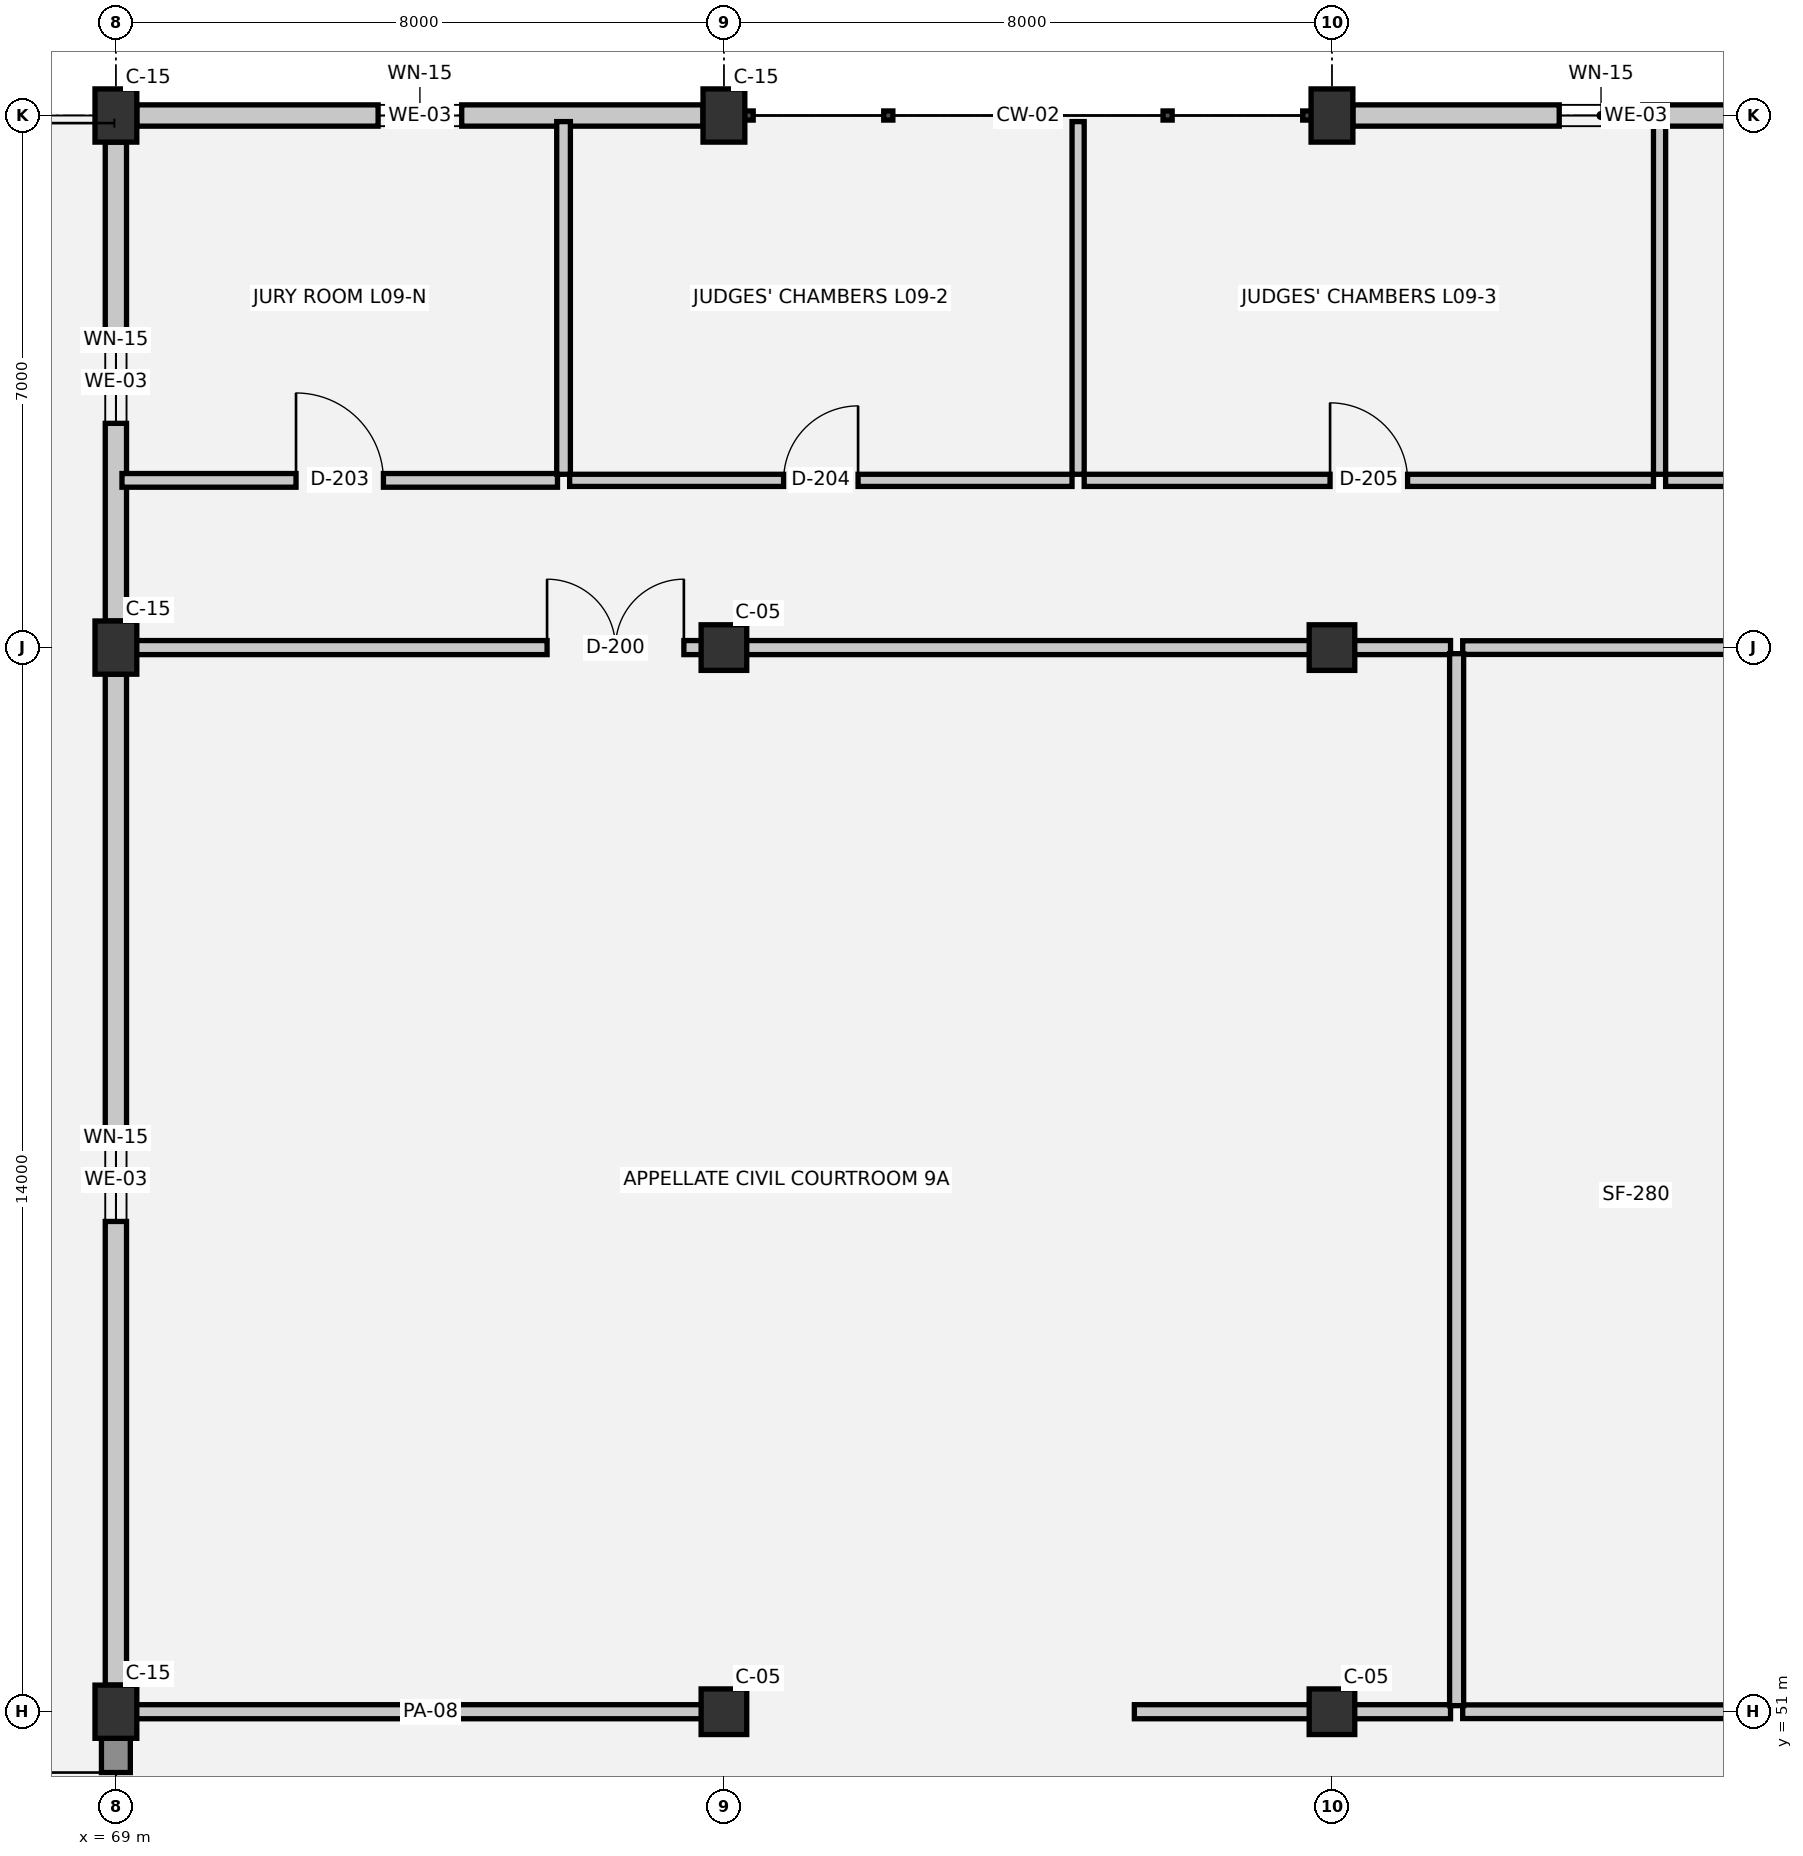
"""IFC4 building model, lengths in metres.
Left out: names, types, materials, properties, quantities, classifications, styles, units other than length and angle.
Written with IfcOpenShell. Run it as: python <this file> out.ifc"""

import sys

from ifc_helpers import new_model, si_unit, direction, frame, frame_2d, origin, origin_2d, place, context, subcontext, project, spatial, rectangle, extrude, element, fill, save


model = new_model("IFC4")
c1 = context("Model", 3, precision=1e-05, world=origin(), true_north=direction((0.0, 1.0)))
c2 = subcontext(c1, "Body", "Model", "MODEL_VIEW")
j1 = project(units=[si_unit("LENGTHUNIT", "METRE"), si_unit("PLANEANGLEUNIT", "RADIAN")], contexts=[c1])
p1 = place(None, origin())
s1 = spatial("IfcSite", under=j1, at=p1, CompositionType="ELEMENT")
p2 = place(p1, origin())
s2 = spatial("IfcBuilding", under=s1, at=p2, CompositionType="ELEMENT")
p3 = place(p2, frame((0.0, 0.0, 33.3)))
s3 = spatial("IfcBuildingStorey", under=s2, at=p3, CompositionType="ELEMENT", Elevation=33.3)
for number, where, z_axis, x_axis in (
    (1, (69.0, 51.0, 0.0), (0.0, 0.0, 1.0), (1.0, 0.0, 0.0)),
    (2, (69.0, 65.0, 0.0), (0.0, 0.0, 1.0), (1.0, 0.0, 0.0)),
    (3, (69.0, 72.0, 0.0), (0.0, 0.0, 1.0), (1.0, 0.0, 0.0)),
):
    element("IfcColumn", number, at=place(p3, frame(where, z_axis=z_axis, x_axis=x_axis)), inside=s3, PredefinedType="COLUMN", context=c2, shape_type="SweptSolid", body=[
        extrude(rectangle(XDim=0.55, YDim=0.7, at=origin_2d()), origin(), (0.0, 0.0, 1.0), 3.75),
    ])
for number, where, z_axis, x_axis in (
    (4, (77.0, 51.0, 0.0), (0.0, 0.0, 1.0), (1.0, 0.0, 0.0)),
    (5, (77.0, 65.0, 0.0), (0.0, 0.0, 1.0), (1.0, 0.0, 0.0)),
):
    element("IfcColumn", number, at=place(p3, frame(where, z_axis=z_axis, x_axis=x_axis)), inside=s3, PredefinedType="COLUMN", context=c2, shape_type="SweptSolid", body=[
        extrude(rectangle(XDim=0.6, YDim=0.6, at=origin_2d()), origin(), (0.0, 0.0, 1.0), 3.75),
    ])
p4 = place(p3, frame((77.0, 72.0, 0.0), z_axis=(0.0, 0.0, 1.0), x_axis=(1.0, 0.0, 0.0)))
e6 = element("IfcColumn", 6, at=p4, inside=s3, PredefinedType="COLUMN", context=c2, shape_type="SweptSolid", body=[
    extrude(rectangle(XDim=0.55, YDim=0.7, at=origin_2d()), origin(), (0.0, 0.0, 1.0), 3.75),
])
for number, where, z_axis, x_axis in (
    (7, (85.0, 51.0, 0.0), (0.0, 0.0, 1.0), (1.0, 0.0, 0.0)),
    (8, (85.0, 65.0, 0.0), (0.0, 0.0, 1.0), (1.0, 0.0, 0.0)),
):
    element("IfcColumn", number, at=place(p3, frame(where, z_axis=z_axis, x_axis=x_axis)), inside=s3, PredefinedType="COLUMN", context=c2, shape_type="SweptSolid", body=[
        extrude(rectangle(XDim=0.6, YDim=0.6, at=origin_2d()), origin(), (0.0, 0.0, 1.0), 3.75),
    ])
p5 = place(p3, frame((85.0, 72.0, 0.0), z_axis=(0.0, 0.0, 1.0), x_axis=(1.0, 0.0, 0.0)))
e9 = element("IfcColumn", 9, at=p5, inside=s3, PredefinedType="COLUMN", context=c2, shape_type="SweptSolid", body=[
    extrude(rectangle(XDim=0.55, YDim=0.7, at=origin_2d()), origin(), (0.0, 0.0, 1.0), 3.75),
])
p6 = place(p3, frame((69.0, 44.35, 0.0), z_axis=(0.0, 0.0, 1.0), x_axis=(0.0, 1.0, 0.0)))
e10 = element("IfcWall", 10, at=p6, inside=s3, PredefinedType="STANDARD", context=c2, shape_type="SweptSolid", body=[
    extrude(rectangle(XDim=6.3, YDim=0.38, at=frame_2d((3.15, 0.0))), origin(), (0.0, 0.0, 1.0), 2.6),
])
p7 = place(p6, frame((4.05, 0.0, 0.0)))
e11 = element("IfcOpeningElement", 11, at=p7, cuts=e10, PredefinedType="OPENING", context=c2, shape_type="SweptSolid", body=[
    extrude(rectangle(XDim=1.8, YDim=2.2, at=frame_2d((0.9, 1.1))), frame((0.0, 0.2, 0.0), z_axis=(0.0, -1.0, 0.0), x_axis=(1.0, 0.0, 0.0)), (0.0, 0.0, 1.0), 0.4),
])
p8 = place(p3, frame((69.0, 51.35, 0.0), z_axis=(0.0, 0.0, 1.0), x_axis=(0.0, 1.0, 0.0)))
e12 = element("IfcWall", 12, at=p8, inside=s3, PredefinedType="SOLIDWALL", context=c2, shape_type="SweptSolid", body=[
    extrude(rectangle(XDim=13.3, YDim=0.28, at=frame_2d((6.65, 0.0))), origin(), (0.0, 0.0, 1.0), 2.6),
])
p9 = place(p8, frame((6.1, 0.0, 0.9)))
e13 = element("IfcOpeningElement", 13, at=p9, cuts=e12, PredefinedType="OPENING", context=c2, shape_type="SweptSolid", body=[
    extrude(rectangle(XDim=1.1, YDim=1.2, at=frame_2d((0.55, 0.6))), frame((0.0, 0.15, 0.0), z_axis=(0.0, -1.0, 0.0), x_axis=(1.0, 0.0, 0.0)), (0.0, 0.0, 1.0), 0.3),
])
p10 = place(p3, frame((69.0, 65.35, 0.0), z_axis=(0.0, 0.0, 1.0), x_axis=(0.0, 1.0, 0.0)))
e14 = element("IfcWall", 14, at=p10, inside=s3, PredefinedType="SOLIDWALL", context=c2, shape_type="SweptSolid", body=[
    extrude(rectangle(XDim=6.3, YDim=0.28, at=frame_2d((3.15, 0.0))), origin(), (0.0, 0.0, 1.0), 2.6),
])
p11 = place(p10, frame((2.6, 0.0, 0.9)))
e15 = element("IfcOpeningElement", 15, at=p11, cuts=e14, PredefinedType="OPENING", context=c2, shape_type="SweptSolid", body=[
    extrude(rectangle(XDim=1.1, YDim=1.2, at=frame_2d((0.55, 0.6))), frame((0.0, 0.15, 0.0), z_axis=(0.0, -1.0, 0.0), x_axis=(1.0, 0.0, 0.0)), (0.0, 0.0, 1.0), 0.3),
])
p12 = place(p3, frame((69.275, 72.0, 0.0), z_axis=(0.0, 0.0, 1.0), x_axis=(1.0, 0.0, 0.0)))
e16 = element("IfcWall", 16, at=p12, inside=s3, PredefinedType="SOLIDWALL", context=c2, shape_type="SweptSolid", body=[
    extrude(rectangle(XDim=7.45, YDim=0.28, at=frame_2d((3.725, 0.0))), origin(), (0.0, 0.0, 1.0), 2.6),
])
p13 = place(p12, frame((3.175, 0.0, 1.0)))
e17 = element("IfcOpeningElement", 17, at=p13, cuts=e16, PredefinedType="OPENING", context=c2, shape_type="SweptSolid", body=[
    extrude(rectangle(XDim=1.1, YDim=1.2, at=frame_2d((0.55, 0.6))), frame((0.0, 0.15, 0.0), z_axis=(0.0, -1.0, 0.0), x_axis=(1.0, 0.0, 0.0)), (0.0, 0.0, 1.0), 0.3),
])
p14 = place(p3, frame((85.275, 72.0, 0.0), z_axis=(0.0, 0.0, 1.0), x_axis=(1.0, 0.0, 0.0)))
e18 = element("IfcWall", 18, at=p14, inside=s3, PredefinedType="SOLIDWALL", context=c2, shape_type="SweptSolid", body=[
    extrude(rectangle(XDim=7.45, YDim=0.28, at=frame_2d((3.725, 0.0))), origin(), (0.0, 0.0, 1.0), 2.6),
])
p15 = place(p14, frame((2.715, 0.0, 1.0)))
e19 = element("IfcOpeningElement", 19, at=p15, cuts=e18, PredefinedType="OPENING", context=c2, shape_type="SweptSolid", body=[
    extrude(rectangle(XDim=1.1, YDim=1.2, at=frame_2d((0.55, 0.6))), frame((0.0, 0.15, 0.0), z_axis=(0.0, -1.0, 0.0), x_axis=(1.0, 0.0, 0.0)), (0.0, 0.0, 1.0), 0.3),
])
p16 = place(p3, frame((69.08, 51.0, 0.0), z_axis=(0.0, 0.0, 1.0), x_axis=(1.0, 0.0, 0.0)))
e20 = element("IfcWall", 20, at=p16, inside=s3, PredefinedType="PARTITIONING", context=c2, shape_type="SweptSolid", body=[
    extrude(rectangle(XDim=8.12, YDim=0.185, at=frame_2d((4.06, 0.0))), origin(), (0.0, 0.0, 1.0), 2.82),
])
p17 = place(p3, frame((82.4, 51.0, 0.0), z_axis=(0.0, 0.0, 1.0), x_axis=(1.0, 0.0, 0.0)))
e21 = element("IfcWall", 21, at=p17, inside=s3, PredefinedType="PARTITIONING", context=c2, shape_type="SweptSolid", body=[
    extrude(rectangle(XDim=4.16, YDim=0.185, at=frame_2d((2.08, 0.0))), origin(), (0.0, 0.0, 1.0), 2.82),
])
p18 = place(p3, frame((86.72, 51.0, 0.0), z_axis=(0.0, 0.0, 1.0), x_axis=(1.0, 0.0, 0.0)))
e22 = element("IfcWall", 22, at=p18, inside=s3, PredefinedType="PARTITIONING", context=c2, shape_type="SweptSolid", body=[
    extrude(rectangle(XDim=11.6, YDim=0.18, at=frame_2d((5.8, 0.0))), origin(), (0.0, 0.0, 1.0), 2.82),
])
p19 = place(p3, frame((69.08, 65.0, 0.0), z_axis=(0.0, 0.0, 1.0), x_axis=(1.0, 0.0, 0.0)))
e23 = element("IfcWall", 23, at=p19, inside=s3, PredefinedType="PARTITIONING", context=c2, shape_type="SweptSolid", body=[
    extrude(rectangle(XDim=17.48, YDim=0.185, at=frame_2d((8.74, 0.0))), origin(), (0.0, 0.0, 1.0), 2.82),
])
p20 = place(p19, frame((5.593, 0.0, 0.0)))
e24 = element("IfcOpeningElement", 24, at=p20, cuts=e23, PredefinedType="OPENING", context=c2, shape_type="SweptSolid", body=[
    extrude(rectangle(XDim=1.8, YDim=2.3, at=frame_2d((0.9, 1.15))), frame((0.0, 0.103, 0.0), z_axis=(0.0, -1.0, 0.0), x_axis=(1.0, 0.0, 0.0)), (0.0, 0.0, 1.0), 0.205),
])
p21 = place(p3, frame((86.72, 65.0, 0.0), z_axis=(0.0, 0.0, 1.0), x_axis=(1.0, 0.0, 0.0)))
e25 = element("IfcWall", 25, at=p21, inside=s3, PredefinedType="PARTITIONING", context=c2, shape_type="SweptSolid", body=[
    extrude(rectangle(XDim=11.6, YDim=0.18, at=frame_2d((5.8, 0.0))), origin(), (0.0, 0.0, 1.0), 2.82),
])
p22 = place(p3, frame((69.08, 67.2, 0.0), z_axis=(0.0, 0.0, 1.0), x_axis=(1.0, 0.0, 0.0)))
e26 = element("IfcWall", 26, at=p22, inside=s3, PredefinedType="PARTITIONING", context=c2, shape_type="SweptSolid", body=[
    extrude(rectangle(XDim=5.73, YDim=0.18, at=frame_2d((2.865, 0.0))), origin(), (0.0, 0.0, 1.0), 3.39),
])
p23 = place(p22, frame((2.29, 0.0, 0.0)))
e27 = element("IfcOpeningElement", 27, at=p23, cuts=e26, PredefinedType="OPENING", context=c2, shape_type="SweptSolid", body=[
    extrude(rectangle(XDim=1.15, YDim=2.2, at=frame_2d((0.575, 1.1))), frame((0.0, 0.1, 0.0), z_axis=(0.0, -1.0, 0.0), x_axis=(1.0, 0.0, 0.0)), (0.0, 0.0, 1.0), 0.2),
])
p24 = place(p3, frame((74.97, 67.2, 0.0), z_axis=(0.0, 0.0, 1.0), x_axis=(1.0, 0.0, 0.0)))
e28 = element("IfcWall", 28, at=p24, inside=s3, PredefinedType="PARTITIONING", context=c2, shape_type="SweptSolid", body=[
    extrude(rectangle(XDim=6.61, YDim=0.16, at=frame_2d((3.305, 0.0))), origin(), (0.0, 0.0, 1.0), 3.39),
])
p25 = place(p24, frame((2.815, 0.0, 0.0)))
e29 = element("IfcOpeningElement", 29, at=p25, cuts=e28, PredefinedType="OPENING", context=c2, shape_type="SweptSolid", body=[
    extrude(rectangle(XDim=0.98, YDim=2.1, at=frame_2d((0.49, 1.05))), frame((0.0, 0.09, 0.0), z_axis=(0.0, -1.0, 0.0), x_axis=(1.0, 0.0, 0.0)), (0.0, 0.0, 1.0), 0.18),
])
p26 = place(p3, frame((81.74, 67.2, 0.0), z_axis=(0.0, 0.0, 1.0), x_axis=(1.0, 0.0, 0.0)))
e30 = element("IfcWall", 30, at=p26, inside=s3, PredefinedType="PARTITIONING", context=c2, shape_type="SweptSolid", body=[
    extrude(rectangle(XDim=7.49, YDim=0.16, at=frame_2d((3.745, 0.0))), origin(), (0.0, 0.0, 1.0), 3.39),
])
p27 = place(p26, frame((3.235, 0.0, 0.0)))
e31 = element("IfcOpeningElement", 31, at=p27, cuts=e30, PredefinedType="OPENING", context=c2, shape_type="SweptSolid", body=[
    extrude(rectangle(XDim=1.02, YDim=2.15, at=frame_2d((0.51, 1.075))), frame((0.0, 0.09, 0.0), z_axis=(0.0, -1.0, 0.0), x_axis=(1.0, 0.0, 0.0)), (0.0, 0.0, 1.0), 0.18),
])
p28 = place(p3, frame((89.39, 67.2, 0.0), z_axis=(0.0, 0.0, 1.0), x_axis=(1.0, 0.0, 0.0)))
e32 = element("IfcWall", 32, at=p28, inside=s3, PredefinedType="PARTITIONING", context=c2, shape_type="SweptSolid", body=[
    extrude(rectangle(XDim=5.61, YDim=0.16, at=frame_2d((2.805, 0.0))), origin(), (0.0, 0.0, 1.0), 3.39),
])
p29 = place(p28, frame((2.285, 0.0, 0.0)))
e33 = element("IfcOpeningElement", 33, at=p29, cuts=e32, PredefinedType="OPENING", context=c2, shape_type="SweptSolid", body=[
    extrude(rectangle(XDim=1.04, YDim=2.15, at=frame_2d((0.52, 1.075))), frame((0.0, 0.09, 0.0), z_axis=(0.0, -1.0, 0.0), x_axis=(1.0, 0.0, 0.0)), (0.0, 0.0, 1.0), 0.18),
])
p30 = place(p3, frame((74.89, 67.28, 0.0), z_axis=(0.0, 0.0, 1.0), x_axis=(0.0, 1.0, 0.0)))
e34 = element("IfcWall", 34, at=p30, inside=s3, PredefinedType="PARTITIONING", context=c2, shape_type="SweptSolid", body=[
    extrude(rectangle(XDim=4.64, YDim=0.18, at=frame_2d((2.32, 0.0))), origin(), (0.0, 0.0, 1.0), 3.39),
])
p31 = place(p3, frame((81.66, 67.28, 0.0), z_axis=(0.0, 0.0, 1.0), x_axis=(0.0, 1.0, 0.0)))
e35 = element("IfcWall", 35, at=p31, inside=s3, PredefinedType="PARTITIONING", context=c2, shape_type="SweptSolid", body=[
    extrude(rectangle(XDim=4.64, YDim=0.16, at=frame_2d((2.32, 0.0))), origin(), (0.0, 0.0, 1.0), 3.39),
])
p32 = place(p3, frame((86.64, 51.08, 0.0), z_axis=(0.0, 0.0, 1.0), x_axis=(0.0, 1.0, 0.0)))
e36 = element("IfcWall", 36, at=p32, inside=s3, PredefinedType="PARTITIONING", context=c2, shape_type="SweptSolid", body=[
    extrude(rectangle(XDim=13.84, YDim=0.185, at=frame_2d((6.92, 0.0))), origin(), (0.0, 0.0, 1.0), 3.39),
])
p33 = place(p3, frame((89.31, 67.28, 0.0), z_axis=(0.0, 0.0, 1.0), x_axis=(0.0, 1.0, 0.0)))
e37 = element("IfcWall", 37, at=p33, inside=s3, PredefinedType="PARTITIONING", context=c2, shape_type="SweptSolid", body=[
    extrude(rectangle(XDim=4.64, YDim=0.16, at=frame_2d((2.32, 0.0))), origin(), (0.0, 0.0, 1.0), 3.39),
])
p34 = place(p7, origin())
e38 = element("IfcDoor", 38, at=p34, inside=s3, OperationType="DOUBLE_DOOR_SINGLE_SWING", PredefinedType="DOOR", context=c2, shape_type="SweptSolid", body=[
    extrude(rectangle(XDim=1.8, YDim=2.2, at=frame_2d((0.9, 1.1))), frame((0.0, 0.025, 0.0), z_axis=(0.0, -1.0, 0.0), x_axis=(1.0, 0.0, 0.0)), (0.0, 0.0, 1.0), 0.05),
])
fill(e11, e38)
p35 = place(p9, origin())
e39 = element("IfcWindow", 39, at=p35, inside=s3, PartitioningType="SINGLE_PANEL", PredefinedType="WINDOW", context=c2, shape_type="SweptSolid", body=[
    extrude(rectangle(XDim=1.1, YDim=1.2, at=frame_2d((0.55, 0.6))), frame((0.0, 0.03, 0.0), z_axis=(0.0, -1.0, 0.0), x_axis=(1.0, 0.0, 0.0)), (0.0, 0.0, 1.0), 0.06),
])
fill(e13, e39)
p36 = place(p11, origin())
e40 = element("IfcWindow", 40, at=p36, inside=s3, PartitioningType="SINGLE_PANEL", PredefinedType="WINDOW", context=c2, shape_type="SweptSolid", body=[
    extrude(rectangle(XDim=1.1, YDim=1.2, at=frame_2d((0.55, 0.6))), frame((0.0, 0.03, 0.0), z_axis=(0.0, -1.0, 0.0), x_axis=(1.0, 0.0, 0.0)), (0.0, 0.0, 1.0), 0.06),
])
fill(e15, e40)
p37 = place(p13, origin())
e41 = element("IfcWindow", 41, at=p37, inside=s3, PartitioningType="SINGLE_PANEL", PredefinedType="WINDOW", context=c2, shape_type="SweptSolid", body=[
    extrude(rectangle(XDim=1.1, YDim=1.2, at=frame_2d((0.55, 0.6))), frame((0.0, 0.03, 0.0), z_axis=(0.0, -1.0, 0.0), x_axis=(1.0, 0.0, 0.0)), (0.0, 0.0, 1.0), 0.06),
])
fill(e17, e41)
p38 = place(p15, origin())
e42 = element("IfcWindow", 42, at=p38, inside=s3, PartitioningType="SINGLE_PANEL", PredefinedType="WINDOW", context=c2, shape_type="SweptSolid", body=[
    extrude(rectangle(XDim=1.1, YDim=1.2, at=frame_2d((0.55, 0.6))), frame((0.0, 0.03, 0.0), z_axis=(0.0, -1.0, 0.0), x_axis=(1.0, 0.0, 0.0)), (0.0, 0.0, 1.0), 0.06),
])
fill(e19, e42)
p39 = place(p20, origin())
e43 = element("IfcDoor", 43, at=p39, inside=s3, OperationType="DOUBLE_DOOR_SINGLE_SWING", PredefinedType="DOOR", context=c2, shape_type="SweptSolid", body=[
    extrude(rectangle(XDim=1.8, YDim=2.3, at=frame_2d((0.9, 1.15))), frame((0.0, 0.025, 0.0), z_axis=(0.0, -1.0, 0.0), x_axis=(1.0, 0.0, 0.0)), (0.0, 0.0, 1.0), 0.05),
])
fill(e24, e43)
p40 = place(p23, origin())
e44 = element("IfcDoor", 44, at=p40, inside=s3, OperationType="SINGLE_SWING_LEFT", PredefinedType="DOOR", context=c2, shape_type="SweptSolid", body=[
    extrude(rectangle(XDim=1.15, YDim=2.2, at=frame_2d((0.575, 1.1))), frame((0.0, 0.025, 0.0), z_axis=(0.0, -1.0, 0.0), x_axis=(1.0, 0.0, 0.0)), (0.0, 0.0, 1.0), 0.05),
])
fill(e27, e44)
p41 = place(p25, origin())
e45 = element("IfcDoor", 45, at=p41, inside=s3, OperationType="SINGLE_SWING_RIGHT", PredefinedType="DOOR", context=c2, shape_type="SweptSolid", body=[
    extrude(rectangle(XDim=0.98, YDim=2.1, at=frame_2d((0.49, 1.05))), frame((0.0, 0.025, 0.0), z_axis=(0.0, -1.0, 0.0), x_axis=(1.0, 0.0, 0.0)), (0.0, 0.0, 1.0), 0.05),
])
fill(e29, e45)
p42 = place(p27, origin())
e46 = element("IfcDoor", 46, at=p42, inside=s3, OperationType="SINGLE_SWING_LEFT", PredefinedType="DOOR", context=c2, shape_type="SweptSolid", body=[
    extrude(rectangle(XDim=1.02, YDim=2.15, at=frame_2d((0.51, 1.075))), frame((0.0, 0.025, 0.0), z_axis=(0.0, -1.0, 0.0), x_axis=(1.0, 0.0, 0.0)), (0.0, 0.0, 1.0), 0.05),
])
fill(e31, e46)
save(model, sys.argv[1])
